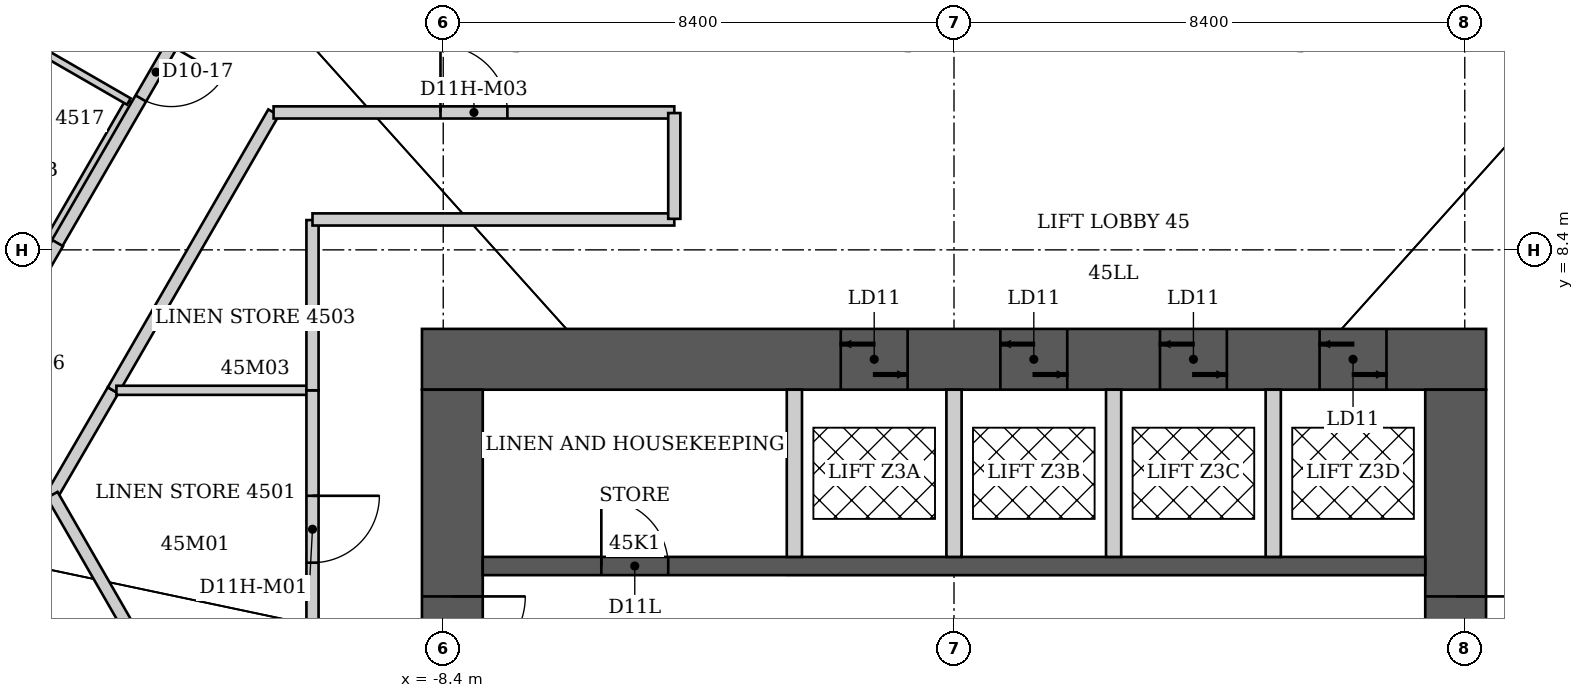
"""IFC4 building model, lengths in metres.
Left out: names, types, materials, properties, quantities, classifications, styles, units other than length and angle.
Written with IfcOpenShell. Run it as: python <this file> out.ifc"""

import sys

from ifc_helpers import new_model, si_unit, direction, frame, frame_2d, origin, place, context, subcontext, project, spatial, rectangle, extrude, element, fill, save


model = new_model("IFC4")
c1 = context("Model", 3, precision=1e-05, world=origin(), true_north=direction((0.0, 1.0)))
c2 = subcontext(c1, "Body", "Model", "MODEL_VIEW")
j1 = project(units=[si_unit("LENGTHUNIT", "METRE"), si_unit("PLANEANGLEUNIT", "RADIAN")], contexts=[c1])
p1 = place(None, origin())
s1 = spatial("IfcSite", under=j1, at=p1, CompositionType="ELEMENT")
p2 = place(p1, origin())
s2 = spatial("IfcBuilding", under=s1, at=p2, CompositionType="ELEMENT")
p3 = place(p2, frame((0.0, 0.0, 183.2)))
s3 = spatial("IfcBuildingStorey", under=s2, at=p3, CompositionType="ELEMENT", Elevation=183.2)
p4 = place(p3, frame((-8.75, 6.6, 0.0), z_axis=(0.0, 0.0, 1.0), x_axis=(1.0, 0.0, 0.0)))
e1 = element("IfcWall", 1, at=p4, inside=s3, PredefinedType="SHEAR", context=c2, shape_type="SweptSolid", body=[
    extrude(rectangle(XDim=17.5, YDim=1.0, at=frame_2d((8.75, 0.0))), origin(), (0.0, 0.0, 1.0), 3.8),
])
p5 = place(p4, frame((6.887, 0.0, 0.0)))
e2 = element("IfcOpeningElement", 2, at=p5, cuts=e1, PredefinedType="OPENING", context=c2, shape_type="SweptSolid", body=[
    extrude(rectangle(XDim=1.1, YDim=2.1, at=frame_2d((0.55, 1.05))), frame((0.0, 0.5, 0.0), z_axis=(0.0, -1.0, 0.0), x_axis=(1.0, 0.0, 0.0)), (0.0, 0.0, 1.0), 1.0),
])
p6 = place(p4, frame((9.512, 0.0, 0.0)))
e3 = element("IfcOpeningElement", 3, at=p6, cuts=e1, PredefinedType="OPENING", context=c2, shape_type="SweptSolid", body=[
    extrude(rectangle(XDim=1.1, YDim=2.1, at=frame_2d((0.55, 1.05))), frame((0.0, 0.5, 0.0), z_axis=(0.0, -1.0, 0.0), x_axis=(1.0, 0.0, 0.0)), (0.0, 0.0, 1.0), 1.0),
])
p7 = place(p4, frame((12.137, 0.0, 0.0)))
e4 = element("IfcOpeningElement", 4, at=p7, cuts=e1, PredefinedType="OPENING", context=c2, shape_type="SweptSolid", body=[
    extrude(rectangle(XDim=1.1, YDim=2.1, at=frame_2d((0.55, 1.05))), frame((0.0, 0.5, 0.0), z_axis=(0.0, -1.0, 0.0), x_axis=(1.0, 0.0, 0.0)), (0.0, 0.0, 1.0), 1.0),
])
p8 = place(p4, frame((14.762, 0.0, 0.0)))
e5 = element("IfcOpeningElement", 5, at=p8, cuts=e1, PredefinedType="OPENING", context=c2, shape_type="SweptSolid", body=[
    extrude(rectangle(XDim=1.1, YDim=2.1, at=frame_2d((0.55, 1.05))), frame((0.0, 0.5, 0.0), z_axis=(0.0, -1.0, 0.0), x_axis=(1.0, 0.0, 0.0)), (0.0, 0.0, 1.0), 1.0),
])
p9 = place(p3, frame((-8.25, -6.1, 0.0), z_axis=(0.0, 0.0, 1.0), x_axis=(0.0, 1.0, 0.0)))
e6 = element("IfcWall", 6, at=p9, inside=s3, PredefinedType="SHEAR", context=c2, shape_type="SweptSolid", body=[
    extrude(rectangle(XDim=12.2, YDim=1.0, at=frame_2d((6.1, 0.0))), origin(), (0.0, 0.0, 1.0), 3.8),
])
p10 = place(p9, frame((7.6, 0.0, 0.0)))
e7 = element("IfcOpeningElement", 7, at=p10, cuts=e6, PredefinedType="OPENING", context=c2, shape_type="SweptSolid", body=[
    extrude(rectangle(XDim=1.2, YDim=2.2, at=frame_2d((0.6, 1.1))), frame((0.0, 0.5, 0.0), z_axis=(0.0, -1.0, 0.0), x_axis=(1.0, 0.0, 0.0)), (0.0, 0.0, 1.0), 1.0),
])
p11 = place(p3, frame((8.25, -6.1, 0.0), z_axis=(0.0, 0.0, 1.0), x_axis=(0.0, 1.0, 0.0)))
e8 = element("IfcWall", 8, at=p11, inside=s3, PredefinedType="SHEAR", context=c2, shape_type="SweptSolid", body=[
    extrude(rectangle(XDim=12.2, YDim=1.0, at=frame_2d((6.1, 0.0))), origin(), (0.0, 0.0, 1.0), 3.8),
])
p12 = place(p11, frame((7.6, 0.0, 0.0)))
e9 = element("IfcOpeningElement", 9, at=p12, cuts=e8, PredefinedType="OPENING", context=c2, shape_type="SweptSolid", body=[
    extrude(rectangle(XDim=1.2, YDim=2.2, at=frame_2d((0.6, 1.1))), frame((0.0, 0.5, 0.0), z_axis=(0.0, -1.0, 0.0), x_axis=(1.0, 0.0, 0.0)), (0.0, 0.0, 1.0), 1.0),
])
p13 = place(p3, frame((-7.75, 3.2, 0.0), z_axis=(0.0, 0.0, 1.0), x_axis=(1.0, 0.0, 0.0)))
e10 = element("IfcWall", 10, at=p13, inside=s3, PredefinedType="SHEAR", context=c2, shape_type="SweptSolid", body=[
    extrude(rectangle(XDim=15.5, YDim=0.3, at=frame_2d((7.75, 0.0))), origin(), (0.0, 0.0, 1.0), 3.8),
])
p14 = place(p13, frame((1.95, 0.0, 0.0)))
e11 = element("IfcOpeningElement", 11, at=p14, cuts=e10, PredefinedType="OPENING", context=c2, shape_type="SweptSolid", body=[
    extrude(rectangle(XDim=1.1, YDim=2.2, at=frame_2d((0.55, 1.1))), frame((0.0, 0.15, 0.0), z_axis=(0.0, -1.0, 0.0), x_axis=(1.0, 0.0, 0.0)), (0.0, 0.0, 1.0), 0.3),
])
for number, where, z_axis, x_axis in (
    (12, (-2.625, 3.35, 0.0), (0.0, 0.0, 1.0), (0.0, 1.0, 0.0)),
    (13, (0.0, 3.35, 0.0), (0.0, 0.0, 1.0), (0.0, 1.0, 0.0)),
    (14, (2.625, 3.35, 0.0), (0.0, 0.0, 1.0), (0.0, 1.0, 0.0)),
    (15, (5.25, 3.35, 0.0), (0.0, 0.0, 1.0), (0.0, 1.0, 0.0)),
):
    element("IfcWall", number, at=place(p3, frame(where, z_axis=z_axis, x_axis=x_axis)), inside=s3, PredefinedType="PARTITIONING", context=c2, shape_type="SweptSolid", body=[
        extrude(rectangle(XDim=2.75, YDim=0.25, at=frame_2d((1.375, 0.0))), origin(), (0.0, 0.0, 1.0), 3.8),
    ])
p15 = place(p3, frame((-14.87, 8.59, 0.0), z_axis=(0.0, 0.0, 1.0), x_axis=(0.500291685314, 0.865856933682, 0.0)))
e16 = element("IfcWall", 16, at=p15, inside=s3, PredefinedType="PARTITIONING", context=c2, shape_type="SweptSolid", body=[
    extrude(rectangle(XDim=2.599, YDim=0.12, at=frame_2d((1.299, 0.0))), origin(), (0.0, 0.0, 1.0), 3.64),
])
p16 = place(p3, frame((-14.83, 4.37, 0.0), z_axis=(0.0, 0.0, 1.0), x_axis=(0.502626855825, 0.864503466623, 0.0)))
e17 = element("IfcWall", 17, at=p16, inside=s3, PredefinedType="PARTITIONING", context=c2, shape_type="SweptSolid", body=[
    extrude(rectangle(XDim=1.99, YDim=0.2, at=frame_2d((0.995, 0.0))), origin(), (0.0, 0.0, 1.0), 3.64),
])
p17 = place(p3, frame((-14.827, 8.554, 0.0), z_axis=(0.0, 0.0, 1.0), x_axis=(0.865865073245, -0.500277597875, 0.0)))
e18 = element("IfcWall", 18, at=p17, inside=s3, PredefinedType="PARTITIONING", context=c2, shape_type="SweptSolid", body=[
    extrude(rectangle(XDim=0.089, YDim=0.2, at=frame_2d((0.044, 0.0))), origin(), (0.0, 0.0, 1.0), 3.64),
])
p18 = place(p3, frame((-14.75, 8.51, 0.0), z_axis=(0.0, 0.0, 1.0), x_axis=(0.500618647881, 0.86566793252, 0.0)))
e19 = element("IfcWall", 19, at=p18, inside=s3, PredefinedType="PARTITIONING", context=c2, shape_type="SweptSolid", body=[
    extrude(rectangle(XDim=4.794, YDim=0.2, at=frame_2d((2.397, 0.0))), origin(), (0.0, 0.0, 1.0), 3.64),
])
p19 = place(p18, frame((2.75, 0.0, 0.0)))
e20 = element("IfcOpeningElement", 20, at=p19, cuts=e19, PredefinedType="OPENING", context=c2, shape_type="SweptSolid", body=[
    extrude(rectangle(XDim=1.0, YDim=2.13, at=frame_2d((0.5, 1.065))), frame((0.0, 0.1, 0.0), z_axis=(0.0, -1.0, 0.0), x_axis=(1.0, 0.0, 0.0)), (0.0, 0.0, 1.0), 0.2),
])
p20 = place(p3, frame((-14.74, 8.51, 0.0), z_axis=(0.0, 0.0, 1.0), x_axis=(-0.501513165407, -0.865150012959, 0.0)))
e21 = element("IfcWall", 21, at=p20, inside=s3, PredefinedType="PARTITIONING", context=c2, shape_type="SweptSolid", body=[
    extrude(rectangle(XDim=4.6, YDim=0.2, at=frame_2d((2.3, 0.0))), origin(), (0.0, 0.0, 1.0), 3.64),
])
p21 = place(p20, frame((1.8, 0.0, 0.0)))
e22 = element("IfcOpeningElement", 22, at=p21, cuts=e21, PredefinedType="OPENING", context=c2, shape_type="SweptSolid", body=[
    extrude(rectangle(XDim=1.0, YDim=2.13, at=frame_2d((0.5, 1.065))), frame((0.0, 0.1, 0.0), z_axis=(0.0, -1.0, 0.0), x_axis=(1.0, 0.0, 0.0)), (0.0, 0.0, 1.0), 0.2),
])
p22 = place(p3, frame((-13.83, 6.09, 0.0), z_axis=(0.0, 0.0, 1.0), x_axis=(0.500248310865, 0.865881993967, 0.0)))
e23 = element("IfcWall", 23, at=p22, inside=s3, PredefinedType="PARTITIONING", context=c2, shape_type="SweptSolid", body=[
    extrude(rectangle(XDim=5.278, YDim=0.2, at=frame_2d((2.639, 0.0))), origin(), (0.0, 0.0, 1.0), 3.64),
])
p23 = place(p3, frame((-13.775, 6.09, 0.0), z_axis=(0.0, 0.0, 1.0), x_axis=(1.0, 0.0, 0.0)))
e24 = element("IfcWall", 24, at=p23, inside=s3, PredefinedType="PARTITIONING", context=c2, shape_type="SweptSolid", body=[
    extrude(rectangle(XDim=3.225, YDim=0.15, at=frame_2d((1.612, 0.0))), origin(), (0.0, 0.0, 1.0), 3.64),
])
p24 = place(p3, frame((-13.57, 10.84, 0.0), z_axis=(0.0, 0.0, 1.0), x_axis=(-0.866177122335, 0.499737123639, 0.0)))
e25 = element("IfcWall", 25, at=p24, inside=s3, PredefinedType="PARTITIONING", context=c2, shape_type="SweptSolid", body=[
    extrude(rectangle(XDim=2.401, YDim=0.12, at=frame_2d((1.201, 0.0))), origin(), (0.0, 0.0, 1.0), 3.64),
])
p25 = place(p3, frame((-13.19, 1.52, 0.0), z_axis=(0.0, 0.0, 1.0), x_axis=(-0.498775186059, 0.866731396554, 0.0)))
e26 = element("IfcWall", 26, at=p25, inside=s3, PredefinedType="PARTITIONING", context=c2, shape_type="SweptSolid", body=[
    extrude(rectangle(XDim=3.288, YDim=0.2, at=frame_2d((1.644, 0.0))), origin(), (0.0, 0.0, 1.0), 3.64),
])
p26 = place(p3, frame((-11.19, 10.66, 0.0), z_axis=(0.0, 0.0, 1.0), x_axis=(1.0, 0.0, 0.0)))
e27 = element("IfcWall", 27, at=p26, inside=s3, PredefinedType="PARTITIONING", context=c2, shape_type="SweptSolid", body=[
    extrude(rectangle(XDim=6.59, YDim=0.2, at=frame_2d((3.295, 0.0))), origin(), (0.0, 0.0, 1.0), 3.64),
])
p27 = place(p26, frame((2.745, 0.0, 0.0)))
e28 = element("IfcOpeningElement", 28, at=p27, cuts=e27, PredefinedType="OPENING", context=c2, shape_type="SweptSolid", body=[
    extrude(rectangle(XDim=1.1, YDim=2.2, at=frame_2d((0.55, 1.1))), frame((0.0, 0.1, 0.0), z_axis=(0.0, -1.0, 0.0), x_axis=(1.0, 0.0, 0.0)), (0.0, 0.0, 1.0), 0.2),
])
p28 = place(p3, frame((-10.55, 6.09, 0.0), z_axis=(0.0, 0.0, 1.0), x_axis=(0.0, -1.0, 0.0)))
e29 = element("IfcWall", 29, at=p28, inside=s3, PredefinedType="PARTITIONING", context=c2, shape_type="SweptSolid", body=[
    extrude(rectangle(XDim=4.57, YDim=0.2, at=frame_2d((2.285, 0.0))), origin(), (0.0, 0.0, 1.0), 3.64),
])
p29 = place(p28, frame((1.735, 0.0, 0.0)))
e30 = element("IfcOpeningElement", 30, at=p29, cuts=e29, PredefinedType="OPENING", context=c2, shape_type="SweptSolid", body=[
    extrude(rectangle(XDim=1.1, YDim=2.2, at=frame_2d((0.55, 1.1))), frame((0.0, 0.1, 0.0), z_axis=(0.0, -1.0, 0.0), x_axis=(1.0, 0.0, 0.0)), (0.0, 0.0, 1.0), 0.2),
])
p30 = place(p3, frame((-10.55, 8.89, 0.0), z_axis=(0.0, 0.0, 1.0), x_axis=(0.0, -1.0, 0.0)))
e31 = element("IfcWall", 31, at=p30, inside=s3, PredefinedType="PARTITIONING", context=c2, shape_type="SweptSolid", body=[
    extrude(rectangle(XDim=2.8, YDim=0.2, at=frame_2d((1.4, 0.0))), origin(), (0.0, 0.0, 1.0), 3.64),
])
p31 = place(p3, frame((-4.6, 8.9, 0.0), z_axis=(0.0, 0.0, 1.0), x_axis=(-1.0, 0.0, 0.0)))
e32 = element("IfcWall", 32, at=p31, inside=s3, PredefinedType="PARTITIONING", context=c2, shape_type="SweptSolid", body=[
    extrude(rectangle(XDim=5.95, YDim=0.2, at=frame_2d((2.975, 0.0))), origin(), (0.0, 0.0, 1.0), 3.64),
])
p32 = place(p3, frame((-4.6, 10.65, 0.0), z_axis=(0.0, 0.0, 1.0), x_axis=(0.0, -1.0, 0.0)))
e33 = element("IfcWall", 33, at=p32, inside=s3, PredefinedType="PARTITIONING", context=c2, shape_type="SweptSolid", body=[
    extrude(rectangle(XDim=1.74, YDim=0.2, at=frame_2d((0.87, 0.0))), origin(), (0.0, 0.0, 1.0), 3.64),
])
p33 = place(p19, origin())
e34 = element("IfcDoor", 34, at=p33, inside=s3, OperationType="SINGLE_SWING_RIGHT", PredefinedType="DOOR", context=c2, shape_type="SweptSolid", body=[
    extrude(rectangle(XDim=1.0, YDim=2.13, at=frame_2d((0.5, 1.065))), frame((0.0, 0.025, 0.0), z_axis=(0.0, -1.0, 0.0), x_axis=(1.0, 0.0, 0.0)), (0.0, 0.0, 1.0), 0.05),
])
fill(e20, e34)
p34 = place(p29, origin())
e35 = element("IfcDoor", 35, at=p34, inside=s3, OperationType="SINGLE_SWING_LEFT", PredefinedType="DOOR", context=c2, shape_type="SweptSolid", body=[
    extrude(rectangle(XDim=1.1, YDim=2.2, at=frame_2d((0.55, 1.1))), frame((0.0, 0.025, 0.0), z_axis=(0.0, -1.0, 0.0), x_axis=(1.0, 0.0, 0.0)), (0.0, 0.0, 1.0), 0.05),
])
fill(e30, e35)
p35 = place(p27, origin())
e36 = element("IfcDoor", 36, at=p35, inside=s3, OperationType="SINGLE_SWING_LEFT", PredefinedType="DOOR", context=c2, shape_type="SweptSolid", body=[
    extrude(rectangle(XDim=1.1, YDim=2.2, at=frame_2d((0.55, 1.1))), frame((0.0, 0.025, 0.0), z_axis=(0.0, -1.0, 0.0), x_axis=(1.0, 0.0, 0.0)), (0.0, 0.0, 1.0), 0.05),
])
fill(e28, e36)
p36 = place(p10, origin())
e37 = element("IfcDoor", 37, at=p36, inside=s3, OperationType="SINGLE_SWING_RIGHT", PredefinedType="DOOR", context=c2, shape_type="SweptSolid", body=[
    extrude(rectangle(XDim=1.2, YDim=2.2, at=frame_2d((0.6, 1.1))), frame((0.0, 0.025, 0.0), z_axis=(0.0, -1.0, 0.0), x_axis=(1.0, 0.0, 0.0)), (0.0, 0.0, 1.0), 0.05),
])
fill(e7, e37)
p37 = place(p12, origin())
e38 = element("IfcDoor", 38, at=p37, inside=s3, OperationType="SINGLE_SWING_RIGHT", PredefinedType="DOOR", context=c2, shape_type="SweptSolid", body=[
    extrude(rectangle(XDim=1.2, YDim=2.2, at=frame_2d((0.6, 1.1))), frame((0.0, 0.025, 0.0), z_axis=(0.0, -1.0, 0.0), x_axis=(1.0, 0.0, 0.0)), (0.0, 0.0, 1.0), 0.05),
])
fill(e9, e38)
p38 = place(p14, origin())
e39 = element("IfcDoor", 39, at=p38, inside=s3, OperationType="SINGLE_SWING_LEFT", PredefinedType="DOOR", context=c2, shape_type="SweptSolid", body=[
    extrude(rectangle(XDim=1.1, YDim=2.2, at=frame_2d((0.55, 1.1))), frame((0.0, 0.025, 0.0), z_axis=(0.0, -1.0, 0.0), x_axis=(1.0, 0.0, 0.0)), (0.0, 0.0, 1.0), 0.05),
])
fill(e11, e39)
p39 = place(p5, origin())
e40 = element("IfcDoor", 40, at=p39, inside=s3, OperationType="DOUBLE_DOOR_SLIDING", PredefinedType="DOOR", context=c2, shape_type="SweptSolid", body=[
    extrude(rectangle(XDim=1.1, YDim=2.1, at=frame_2d((0.55, 1.05))), frame((0.0, 0.025, 0.0), z_axis=(0.0, -1.0, 0.0), x_axis=(1.0, 0.0, 0.0)), (0.0, 0.0, 1.0), 0.05),
])
fill(e2, e40)
p40 = place(p6, origin())
e41 = element("IfcDoor", 41, at=p40, inside=s3, OperationType="DOUBLE_DOOR_SLIDING", PredefinedType="DOOR", context=c2, shape_type="SweptSolid", body=[
    extrude(rectangle(XDim=1.1, YDim=2.1, at=frame_2d((0.55, 1.05))), frame((0.0, 0.025, 0.0), z_axis=(0.0, -1.0, 0.0), x_axis=(1.0, 0.0, 0.0)), (0.0, 0.0, 1.0), 0.05),
])
fill(e3, e41)
p41 = place(p7, origin())
e42 = element("IfcDoor", 42, at=p41, inside=s3, OperationType="DOUBLE_DOOR_SLIDING", PredefinedType="DOOR", context=c2, shape_type="SweptSolid", body=[
    extrude(rectangle(XDim=1.1, YDim=2.1, at=frame_2d((0.55, 1.05))), frame((0.0, 0.025, 0.0), z_axis=(0.0, -1.0, 0.0), x_axis=(1.0, 0.0, 0.0)), (0.0, 0.0, 1.0), 0.05),
])
fill(e4, e42)
p42 = place(p8, origin())
e43 = element("IfcDoor", 43, at=p42, inside=s3, OperationType="DOUBLE_DOOR_SLIDING", PredefinedType="DOOR", context=c2, shape_type="SweptSolid", body=[
    extrude(rectangle(XDim=1.1, YDim=2.1, at=frame_2d((0.55, 1.05))), frame((0.0, 0.025, 0.0), z_axis=(0.0, -1.0, 0.0), x_axis=(1.0, 0.0, 0.0)), (0.0, 0.0, 1.0), 0.05),
])
fill(e5, e43)
save(model, sys.argv[1])
